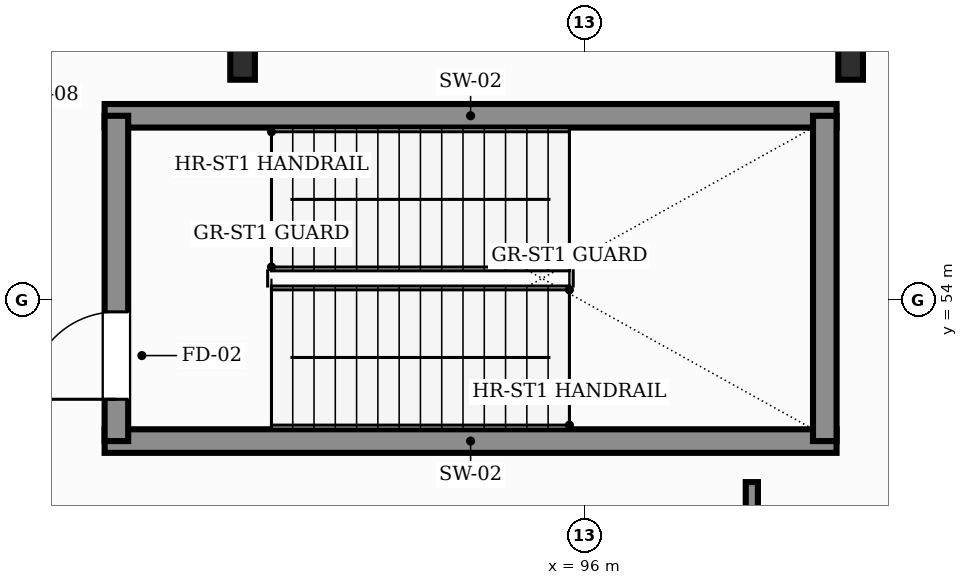
"""IFC4 building model, lengths in metres.
Left out: names, types, materials, properties, quantities, classifications, styles, units other than length and angle.
Written with IfcOpenShell. Run it as: python <this file> out.ifc"""

import sys

from ifc_helpers import new_model, si_unit, direction, frame, frame_2d, origin, origin_2d, place, context, subcontext, project, spatial, rectangle, i_section, extrude, element, fill, save


model = new_model("IFC4")
c1 = context("Model", 3, precision=1e-05, world=origin(), true_north=direction((0.0, 1.0)))
c2 = subcontext(c1, "Body", "Model", "MODEL_VIEW")
j1 = project(units=[si_unit("LENGTHUNIT", "METRE"), si_unit("PLANEANGLEUNIT", "RADIAN")], contexts=[c1])
p1 = place(None, origin())
s1 = spatial("IfcSite", under=j1, at=p1, CompositionType="ELEMENT")
p2 = place(p1, origin())
s2 = spatial("IfcBuilding", under=s1, at=p2, CompositionType="ELEMENT")
p3 = place(p2, frame((0.0, 0.0, 6.0)))
s3 = spatial("IfcBuildingStorey", under=s2, at=p3, CompositionType="ELEMENT", Elevation=6.0)
for number, where, z_axis, x_axis in (
    (1, (91.5, 57.2, 0.0), (0.0, 0.0, 1.0), (1.0, 0.0, 0.0)),
    (2, (99.5, 57.2, 0.0), (0.0, 0.0, 1.0), (1.0, 0.0, 0.0)),
):
    element("IfcColumn", number, at=place(p3, frame(where, z_axis=z_axis, x_axis=x_axis)), inside=s3, PredefinedType="COLUMN", context=c2, shape_type="SweptSolid", body=[
        extrude(i_section(OverallWidth=0.324, OverallDepth=0.611, WebThickness=0.013, FlangeThickness=0.019, FilletRadius=0.013, at=origin_2d()), origin(), (0.0, 0.0, 1.0), 5.4),
    ])
for number, where, z_axis, x_axis in (
    (3, (89.685, 52.14, 0.0), (0.0, 0.0, 1.0), (1.0, 0.0, 0.0)),
    (4, (89.685, 56.42, 0.0), (0.0, 0.0, 1.0), (1.0, 0.0, 0.0)),
):
    element("IfcWall", number, at=place(p3, frame(where, z_axis=z_axis, x_axis=x_axis)), inside=s3, PredefinedType="SHEAR", context=c2, shape_type="SweptSolid", body=[
        extrude(rectangle(XDim=9.63, YDim=0.31, at=frame_2d((4.815, 0.0))), origin(), (0.0, 0.0, 1.0), 5.4),
    ])
p4 = place(p3, frame((89.84, 52.14, 0.0), z_axis=(0.0, 0.0, 1.0), x_axis=(0.0, 1.0, 0.0)))
e5 = element("IfcWall", 5, at=p4, inside=s3, PredefinedType="SHEAR", context=c2, shape_type="SweptSolid", body=[
    extrude(rectangle(XDim=4.28, YDim=0.31, at=frame_2d((2.14, 0.0))), origin(), (0.0, 0.0, 1.0), 5.4),
])
p5 = place(p4, frame((0.55, 0.0, 0.0)))
e6 = element("IfcOpeningElement", 6, at=p5, cuts=e5, PredefinedType="OPENING", context=c2, shape_type="SweptSolid", body=[
    extrude(rectangle(XDim=1.15, YDim=2.2, at=frame_2d((0.575, 1.1))), frame((0.0, 0.165, 0.0), z_axis=(0.0, -1.0, 0.0), x_axis=(1.0, 0.0, 0.0)), (0.0, 0.0, 1.0), 0.33),
])
p6 = place(p3, frame((99.16, 52.14, 0.0), z_axis=(0.0, 0.0, 1.0), x_axis=(0.0, 1.0, 0.0)))
e7 = element("IfcWall", 7, at=p6, inside=s3, PredefinedType="SHEAR", context=c2, shape_type="SweptSolid", body=[
    extrude(rectangle(XDim=4.28, YDim=0.31, at=frame_2d((2.14, 0.0))), origin(), (0.0, 0.0, 1.0), 5.4),
])
p7 = place(p3, frame((98.2, 27.4, 0.0), z_axis=(0.0, 0.0, 1.0), x_axis=(0.0, 1.0, 0.0)))
e8 = element("IfcWall", 8, at=p7, inside=s3, PredefinedType="PARTITIONING", context=c2, shape_type="SweptSolid", body=[
    extrude(rectangle(XDim=24.2, YDim=0.16, at=frame_2d((12.1, 0.0))), origin(), (0.0, 0.0, 1.0), 3.85),
])
p8 = place(p7, frame((6.5, 0.0, 0.0)))
e9 = element("IfcOpeningElement", 9, at=p8, cuts=e8, PredefinedType="OPENING", context=c2, shape_type="SweptSolid", body=[
    extrude(rectangle(XDim=2.2, YDim=2.6, at=frame_2d((1.1, 1.3))), frame((0.0, 0.09, 0.0), z_axis=(0.0, -1.0, 0.0), x_axis=(1.0, 0.0, 0.0)), (0.0, 0.0, 1.0), 0.18),
])
p9 = place(p7, frame((16.5, 0.0, 0.0)))
e10 = element("IfcOpeningElement", 10, at=p9, cuts=e8, PredefinedType="OPENING", context=c2, shape_type="SweptSolid", body=[
    extrude(rectangle(XDim=2.2, YDim=2.6, at=frame_2d((1.1, 1.3))), frame((0.0, 0.09, 0.0), z_axis=(0.0, -1.0, 0.0), x_axis=(1.0, 0.0, 0.0)), (0.0, 0.0, 1.0), 0.18),
])
p10 = place(p5, origin())
e11 = element("IfcDoor", 11, at=p10, inside=s3, OperationType="SINGLE_SWING_LEFT", PredefinedType="DOOR", context=c2, shape_type="SweptSolid", body=[
    extrude(rectangle(XDim=1.15, YDim=2.2, at=frame_2d((0.575, 1.1))), frame((0.0, 0.025, 0.0), z_axis=(0.0, -1.0, 0.0), x_axis=(1.0, 0.0, 0.0)), (0.0, 0.0, 1.0), 0.05),
])
fill(e6, e11)
save(model, sys.argv[1])
